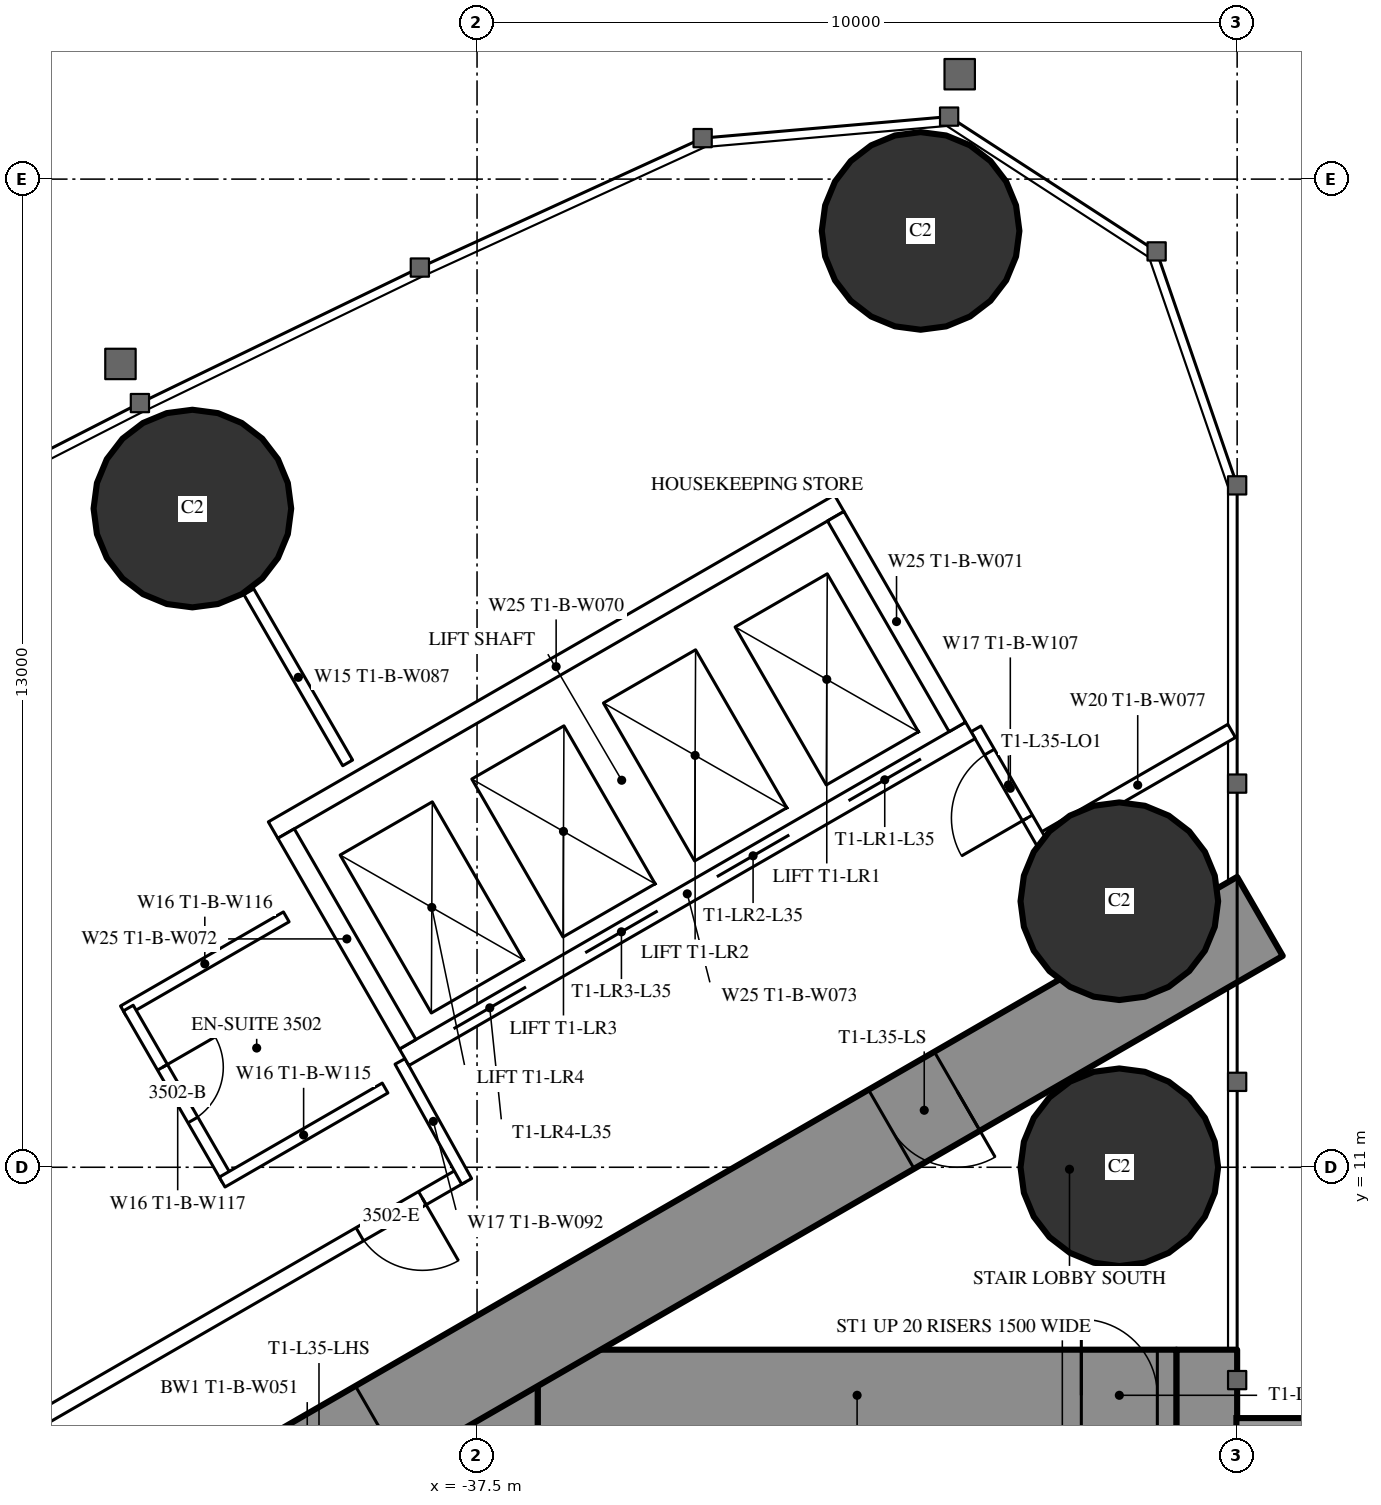
"""IFC4 building model, lengths in metres.
Left out: names, types, materials, properties, quantities, classifications, styles, units other than length and angle.
Written with IfcOpenShell. Run it as: python <this file> out.ifc"""

import sys

from ifc_helpers import new_model, si_unit, direction, frame, frame_2d, origin, origin_2d, place, context, subcontext, project, spatial, rectangle, hollow_circle, extrude, element, fill, save


model = new_model("IFC4")
c1 = context("Model", 3, precision=1e-05, world=origin(), true_north=direction((0.0, 1.0)))
c2 = subcontext(c1, "Body", "Model", "MODEL_VIEW")
j1 = project(units=[si_unit("LENGTHUNIT", "METRE"), si_unit("PLANEANGLEUNIT", "RADIAN")], contexts=[c1])
p1 = place(None, origin())
s1 = spatial("IfcSite", under=j1, at=p1, CompositionType="ELEMENT")
p2 = place(p1, origin())
s2 = spatial("IfcBuilding", under=s1, at=p2, CompositionType="ELEMENT")
p3 = place(p2, frame((0.0, 0.0, 132.6)))
s3 = spatial("IfcBuildingStorey", under=s2, at=p3, CompositionType="ELEMENT", Elevation=132.6)
for number, where, z_axis, x_axis in (
    (1, (-31.665, 23.318, 0.0), (0.0, 0.0, 1.0), (1.0, 0.0, 0.0)),
    (2, (-29.05, 11.0, 0.0), (0.0, 0.0, 1.0), (1.0, 0.0, 0.0)),
    (3, (-29.05, 14.5, 0.0), (0.0, 0.0, 1.0), (1.0, 0.0, 0.0)),
    (4, (-41.245, 19.666, 0.0), (0.0, 0.0, 1.0), (1.0, 0.0, 0.0)),
):
    element("IfcColumn", number, at=place(p3, frame(where, z_axis=z_axis, x_axis=x_axis)), inside=s3, PredefinedType="COLUMN", context=c2, shape_type="SweptSolid", body=[
        extrude(hollow_circle(Radius=1.3, WallThickness=0.1, at=origin_2d()), origin(), (0.0, 0.0, 1.0), 3.5),
    ])
p4 = place(p3, frame((-27.9, 8.6, 0.0), z_axis=(0.0, 0.0, 1.0), x_axis=(0.0, -1.0, 0.0)))
e5 = element("IfcWall", 5, at=p4, inside=s3, PredefinedType="SHEAR", context=c2, shape_type="SweptSolid", body=[
    extrude(rectangle(XDim=17.2, YDim=0.8, at=frame_2d((8.6, 0.0))), origin(), (0.0, 0.0, 1.0), 3.5),
])
p5 = place(p4, frame((2.45, 0.0, 0.6)))
e6 = element("IfcOpeningElement", 6, at=p5, cuts=e5, PredefinedType="OPENING", context=c2, shape_type="SweptSolid", body=[
    extrude(rectangle(XDim=0.6, YDim=2.1, at=frame_2d((0.3, 1.05))), frame((0.0, 0.41, 0.0), z_axis=(0.0, -1.0, 0.0), x_axis=(1.0, 0.0, 0.0)), (0.0, 0.0, 1.0), 0.82),
])
p6 = place(p4, frame((14.15, 0.0, 0.6)))
e7 = element("IfcOpeningElement", 7, at=p6, cuts=e5, PredefinedType="OPENING", context=c2, shape_type="SweptSolid", body=[
    extrude(rectangle(XDim=0.6, YDim=2.1, at=frame_2d((0.3, 1.05))), frame((0.0, 0.41, 0.0), z_axis=(0.0, -1.0, 0.0), x_axis=(1.0, 0.0, 0.0)), (0.0, 0.0, 1.0), 0.82),
])
p7 = place(p3, frame((-37.3, 8.6, 0.0), z_axis=(0.0, 0.0, 1.0), x_axis=(0.0, -1.0, 0.0)))
e8 = element("IfcWall", 8, at=p7, inside=s3, PredefinedType="SHEAR", context=c2, shape_type="SweptSolid", body=[
    extrude(rectangle(XDim=17.2, YDim=1.2, at=frame_2d((8.6, 0.0))), origin(), (0.0, 0.0, 1.0), 3.5),
])
p8 = place(p7, frame((7.7, 0.0, 0.0)))
e9 = element("IfcOpeningElement", 9, at=p8, cuts=e8, PredefinedType="OPENING", context=c2, shape_type="SweptSolid", body=[
    extrude(rectangle(XDim=1.8, YDim=2.2, at=frame_2d((0.9, 1.1))), frame((0.0, 0.61, 0.0), z_axis=(0.0, -1.0, 0.0), x_axis=(1.0, 0.0, 0.0)), (0.0, 0.0, 1.0), 1.22),
])
p9 = place(p3, frame((-28.3, 8.0, 0.0), z_axis=(0.0, 0.0, 1.0), x_axis=(-1.0, 0.0, 0.0)))
e10 = element("IfcWall", 10, at=p9, inside=s3, PredefinedType="SHEAR", context=c2, shape_type="SweptSolid", body=[
    extrude(rectangle(XDim=8.4, YDim=1.2, at=frame_2d((4.2, 0.0))), origin(), (0.0, 0.0, 1.0), 3.5),
])
p10 = place(p9, frame((0.25, 0.0, 0.0)))
e11 = element("IfcOpeningElement", 11, at=p10, cuts=e10, PredefinedType="OPENING", context=c2, shape_type="SweptSolid", body=[
    extrude(rectangle(XDim=1.0, YDim=2.2, at=frame_2d((0.5, 1.1))), frame((0.0, 0.61, 0.0), z_axis=(0.0, -1.0, 0.0), x_axis=(1.0, 0.0, 0.0)), (0.0, 0.0, 1.0), 1.22),
])
p11 = place(p3, frame((-27.2, 14.3, 0.0), z_axis=(0.0, 0.0, 1.0), x_axis=(-0.866026593062, -0.499997940104, 0.0)))
e12 = element("IfcWall", 12, at=p11, inside=s3, PredefinedType="SHEAR", context=c2, shape_type="SweptSolid", body=[
    extrude(rectangle(XDim=28.946, YDim=1.2, at=frame_2d((14.473, 0.0))), origin(), (0.0, 0.0, 1.0), 3.5),
])
p12 = place(p11, frame((4.6, 0.0, 0.0)))
e13 = element("IfcOpeningElement", 13, at=p12, cuts=e12, PredefinedType="OPENING", context=c2, shape_type="SweptSolid", body=[
    extrude(rectangle(XDim=1.0, YDim=2.2, at=frame_2d((0.5, 1.1))), frame((0.0, 0.61, 0.0), z_axis=(0.0, -1.0, 0.0), x_axis=(1.0, 0.0, 0.0)), (0.0, 0.0, 1.0), 1.22),
])
p13 = place(p11, frame((13.395, 0.0, 0.0)))
e14 = element("IfcOpeningElement", 14, at=p13, cuts=e12, PredefinedType="OPENING", context=c2, shape_type="SweptSolid", body=[
    extrude(rectangle(XDim=1.8, YDim=2.2, at=frame_2d((0.9, 1.1))), frame((0.0, 0.61, 0.0), z_axis=(0.0, -1.0, 0.0), x_axis=(1.0, 0.0, 0.0)), (0.0, 0.0, 1.0), 1.22),
])
p14 = place(p3, frame((-39.202, 16.32, 0.0), z_axis=(0.0, 0.0, 1.0), x_axis=(-0.499947391036, 0.866055775454, 0.0)))
e15 = element("IfcWall", 15, at=p14, inside=s3, PredefinedType="PARTITIONING", context=c2, shape_type="SweptSolid", body=[
    extrude(rectangle(XDim=2.599, YDim=0.15, at=frame_2d((1.3, 0.0))), origin(), (0.0, 0.0, 1.0), 3.25),
])
p15 = place(p3, frame((-27.572, 16.741, 0.0), z_axis=(0.0, 0.0, 1.0), x_axis=(-0.866034618596, -0.499984039138, 0.0)))
e16 = element("IfcWall", 16, at=p15, inside=s3, PredefinedType="PARTITIONING", context=c2, shape_type="SweptSolid", body=[
    extrude(rectangle(XDim=2.854, YDim=0.2, at=frame_2d((1.427, 0.0))), origin(), (0.0, 0.0, 1.0), 3.25),
])
p16 = place(p3, frame((-37.7, 10.894, 0.0), z_axis=(0.0, 0.0, 1.0), x_axis=(-0.866027905338, -0.499995667157, 0.0)))
e17 = element("IfcWall", 17, at=p16, inside=s3, PredefinedType="PARTITIONING", context=c2, shape_type="SweptSolid", body=[
    extrude(rectangle(XDim=21.787, YDim=0.2, at=frame_2d((10.894, 0.0))), origin(), (0.0, 0.0, 1.0), 3.25),
])
p17 = place(p16, frame((17.711, 0.0, 0.0)))
e18 = element("IfcOpeningElement", 18, at=p17, cuts=e17, PredefinedType="OPENING", context=c2, shape_type="SweptSolid", body=[
    extrude(rectangle(XDim=0.95, YDim=2.2, at=frame_2d((0.475, 1.1))), frame((0.0, 0.11, 0.0), z_axis=(0.0, -1.0, 0.0), x_axis=(1.0, 0.0, 0.0)), (0.0, 0.0, 1.0), 0.22),
])
p18 = place(p16, frame((19.399, 0.0, 0.0)))
e19 = element("IfcOpeningElement", 19, at=p18, cuts=e17, PredefinedType="OPENING", context=c2, shape_type="SweptSolid", body=[
    extrude(rectangle(XDim=1.8, YDim=2.2, at=frame_2d((0.9, 1.1))), frame((0.0, 0.11, 0.0), z_axis=(0.0, -1.0, 0.0), x_axis=(1.0, 0.0, 0.0)), (0.0, 0.0, 1.0), 0.22),
])
p19 = place(p16, frame((0.6, 0.0, 0.0)))
e20 = element("IfcOpeningElement", 20, at=p19, cuts=e17, PredefinedType="OPENING", context=c2, shape_type="SweptSolid", body=[
    extrude(rectangle(XDim=0.95, YDim=2.2, at=frame_2d((0.475, 1.1))), frame((0.0, 0.11, 0.0), z_axis=(0.0, -1.0, 0.0), x_axis=(1.0, 0.0, 0.0)), (0.0, 0.0, 1.0), 0.22),
])
p20 = place(p3, frame((-38.513, 12.392, 0.0), z_axis=(0.0, 0.0, 1.0), x_axis=(0.485585508183, -0.874189175317, 0.0)))
e21 = element("IfcWall", 21, at=p20, inside=s3, PredefinedType="PARTITIONING", context=c2, shape_type="SweptSolid", body=[
    extrude(rectangle(XDim=1.805, YDim=0.15, at=frame_2d((0.902, 0.0))), origin(), (0.0, 0.0, 1.0), 3.25),
])
p21 = place(p3, frame((-30.033, 15.205, 0.0), z_axis=(0.0, 0.0, 1.0), x_axis=(-0.499980071345, 0.866036909293, 0.0)))
e22 = element("IfcWall", 22, at=p21, inside=s3, PredefinedType="PARTITIONING", context=c2, shape_type="SweptSolid", body=[
    extrude(rectangle(XDim=1.805, YDim=0.15, at=frame_2d((0.902, 0.0))), origin(), (0.0, 0.0, 1.0), 2.2),
])
p22 = place(p21, frame((0.452, 0.0, 0.0)))
e23 = element("IfcOpeningElement", 23, at=p22, cuts=e22, PredefinedType="OPENING", context=c2, shape_type="SweptSolid", body=[
    extrude(rectangle(XDim=1.0, YDim=2.2, at=frame_2d((0.5, 1.1))), frame((0.0, 0.085, 0.0), z_axis=(0.0, -1.0, 0.0), x_axis=(1.0, 0.0, 0.0)), (0.0, 0.0, 1.0), 0.17),
])
p23 = place(p3, frame((-40.01, 14.294, 0.0), z_axis=(0.0, 0.0, 1.0), x_axis=(-0.866031185235, -0.4999899861, 0.0)))
e24 = element("IfcWall", 24, at=p23, inside=s3, PredefinedType="PARTITIONING", context=c2, shape_type="SweptSolid", body=[
    extrude(rectangle(XDim=2.475, YDim=0.15, at=frame_2d((1.238, 0.0))), origin(), (0.0, 0.0, 1.0), 3.25),
])
p24 = place(p3, frame((-40.788, 10.843, 0.0), z_axis=(0.0, 0.0, 1.0), x_axis=(-0.500006934395, 0.866021400173, 0.0)))
e25 = element("IfcWall", 25, at=p24, inside=s3, PredefinedType="PARTITIONING", context=c2, shape_type="SweptSolid", body=[
    extrude(rectangle(XDim=2.6, YDim=0.15, at=frame_2d((1.3, 0.0))), origin(), (0.0, 0.0, 1.0), 3.25),
])
p25 = place(p24, frame((0.9, 0.0, 0.0)))
e26 = element("IfcOpeningElement", 26, at=p25, cuts=e25, PredefinedType="OPENING", context=c2, shape_type="SweptSolid", body=[
    extrude(rectangle(XDim=0.8, YDim=2.2, at=frame_2d((0.4, 1.1))), frame((0.0, 0.085, 0.0), z_axis=(0.0, -1.0, 0.0), x_axis=(1.0, 0.0, 0.0)), (0.0, 0.0, 1.0), 0.17),
])
p26 = place(p3, frame((-38.71, 12.042, 0.0), z_axis=(0.0, 0.0, 1.0), x_axis=(-0.86604923931, -0.499958713387, 0.0)))
e27 = element("IfcWall", 27, at=p26, inside=s3, PredefinedType="PARTITIONING", context=c2, shape_type="SweptSolid", body=[
    extrude(rectangle(XDim=2.475, YDim=0.15, at=frame_2d((1.237, 0.0))), origin(), (0.0, 0.0, 1.0), 3.25),
])
p27 = place(p3, frame((-31.01, 16.747, 0.0), z_axis=(0.0, 0.0, 1.0), x_axis=(-0.866028165386, -0.499995216735, 0.0)))
e28 = element("IfcWall", 28, at=p27, inside=s3, PredefinedType="PARTITIONING", context=c2, shape_type="SweptSolid", body=[
    extrude(rectangle(XDim=8.6, YDim=0.25, at=frame_2d((4.3, 0.0))), origin(), (0.0, 0.0, 1.0), 3.25),
])
p28 = place(p27, frame((0.75, 0.0, 0.0)))
e29 = element("IfcOpeningElement", 29, at=p28, cuts=e28, PredefinedType="OPENING", context=c2, shape_type="SweptSolid", body=[
    extrude(rectangle(XDim=1.1, YDim=2.2, at=frame_2d((0.55, 1.1))), frame((0.0, 0.135, 0.0), z_axis=(0.0, -1.0, 0.0), x_axis=(1.0, 0.0, 0.0)), (0.0, 0.0, 1.0), 0.27),
])
p29 = place(p27, frame((2.75, 0.0, 0.0)))
e30 = element("IfcOpeningElement", 30, at=p29, cuts=e28, PredefinedType="OPENING", context=c2, shape_type="SweptSolid", body=[
    extrude(rectangle(XDim=1.1, YDim=2.2, at=frame_2d((0.55, 1.1))), frame((0.0, 0.135, 0.0), z_axis=(0.0, -1.0, 0.0), x_axis=(1.0, 0.0, 0.0)), (0.0, 0.0, 1.0), 0.27),
])
p30 = place(p27, frame((4.75, 0.0, 0.0)))
e31 = element("IfcOpeningElement", 31, at=p30, cuts=e28, PredefinedType="OPENING", context=c2, shape_type="SweptSolid", body=[
    extrude(rectangle(XDim=1.1, YDim=2.2, at=frame_2d((0.55, 1.1))), frame((0.0, 0.135, 0.0), z_axis=(0.0, -1.0, 0.0), x_axis=(1.0, 0.0, 0.0)), (0.0, 0.0, 1.0), 0.27),
])
p31 = place(p27, frame((6.75, 0.0, 0.0)))
e32 = element("IfcOpeningElement", 32, at=p31, cuts=e28, PredefinedType="OPENING", context=c2, shape_type="SweptSolid", body=[
    extrude(rectangle(XDim=1.1, YDim=2.2, at=frame_2d((0.55, 1.1))), frame((0.0, 0.135, 0.0), z_axis=(0.0, -1.0, 0.0), x_axis=(1.0, 0.0, 0.0)), (0.0, 0.0, 1.0), 0.27),
])
p32 = place(p3, frame((-32.736, 19.736, 0.0), z_axis=(0.0, 0.0, 1.0), x_axis=(-0.866028165386, -0.499995216735, 0.0)))
e33 = element("IfcWall", 33, at=p32, inside=s3, PredefinedType="PARTITIONING", context=c2, shape_type="SweptSolid", body=[
    extrude(rectangle(XDim=8.6, YDim=0.25, at=frame_2d((4.3, 0.0))), origin(), (0.0, 0.0, 1.0), 3.25),
])
p33 = place(p3, frame((-31.181, 16.793, 0.0), z_axis=(0.0, 0.0, 1.0), x_axis=(-0.499929347863, 0.866066190972, 0.0)))
e34 = element("IfcWall", 34, at=p33, inside=s3, PredefinedType="PARTITIONING", context=c2, shape_type="SweptSolid", body=[
    extrude(rectangle(XDim=3.201, YDim=0.25, at=frame_2d((1.6, 0.0))), origin(), (0.0, 0.0, 1.0), 3.25),
])
p34 = place(p3, frame((-38.413, 12.618, 0.0), z_axis=(0.0, 0.0, 1.0), x_axis=(-0.499872130319, 0.866099216793, 0.0)))
e35 = element("IfcWall", 35, at=p34, inside=s3, PredefinedType="PARTITIONING", context=c2, shape_type="SweptSolid", body=[
    extrude(rectangle(XDim=3.2, YDim=0.25, at=frame_2d((1.6, 0.0))), origin(), (0.0, 0.0, 1.0), 3.25),
])
p35 = place(p25, origin())
e36 = element("IfcDoor", 36, at=p35, inside=s3, OperationType="SINGLE_SWING_RIGHT", PredefinedType="DOOR", context=c2, shape_type="SweptSolid", body=[
    extrude(rectangle(XDim=0.8, YDim=2.2, at=frame_2d((0.4, 1.1))), frame((0.0, 0.025, 0.0), z_axis=(0.0, -1.0, 0.0), x_axis=(1.0, 0.0, 0.0)), (0.0, 0.0, 1.0), 0.05),
])
fill(e26, e36)
p36 = place(p19, origin())
e37 = element("IfcDoor", 37, at=p36, inside=s3, OperationType="SINGLE_SWING_LEFT", PredefinedType="DOOR", context=c2, shape_type="SweptSolid", body=[
    extrude(rectangle(XDim=0.95, YDim=2.2, at=frame_2d((0.475, 1.1))), frame((0.0, 0.025, 0.0), z_axis=(0.0, -1.0, 0.0), x_axis=(1.0, 0.0, 0.0)), (0.0, 0.0, 1.0), 0.05),
])
fill(e20, e37)
p37 = place(p22, origin())
e38 = element("IfcDoor", 38, at=p37, inside=s3, OperationType="SINGLE_SWING_LEFT", PredefinedType="DOOR", context=c2, shape_type="SweptSolid", body=[
    extrude(rectangle(XDim=1.0, YDim=2.2, at=frame_2d((0.5, 1.1))), frame((0.0, 0.025, 0.0), z_axis=(0.0, -1.0, 0.0), x_axis=(1.0, 0.0, 0.0)), (0.0, 0.0, 1.0), 0.05),
])
fill(e23, e38)
p38 = place(p12, origin())
e39 = element("IfcDoor", 39, at=p38, inside=s3, OperationType="SINGLE_SWING_LEFT", PredefinedType="DOOR", context=c2, shape_type="SweptSolid", body=[
    extrude(rectangle(XDim=1.0, YDim=2.2, at=frame_2d((0.5, 1.1))), frame((0.0, 0.025, 0.0), z_axis=(0.0, -1.0, 0.0), x_axis=(1.0, 0.0, 0.0)), (0.0, 0.0, 1.0), 0.05),
])
fill(e13, e39)
p39 = place(p13, origin())
e40 = element("IfcDoor", 40, at=p39, inside=s3, OperationType="DOUBLE_DOOR_SINGLE_SWING", PredefinedType="DOOR", context=c2, shape_type="SweptSolid", body=[
    extrude(rectangle(XDim=1.8, YDim=2.2, at=frame_2d((0.9, 1.1))), frame((0.0, 0.025, 0.0), z_axis=(0.0, -1.0, 0.0), x_axis=(1.0, 0.0, 0.0)), (0.0, 0.0, 1.0), 0.05),
])
fill(e14, e40)
p40 = place(p10, origin())
e41 = element("IfcDoor", 41, at=p40, inside=s3, OperationType="SINGLE_SWING_RIGHT", PredefinedType="DOOR", context=c2, shape_type="SweptSolid", body=[
    extrude(rectangle(XDim=1.0, YDim=2.2, at=frame_2d((0.5, 1.1))), frame((0.0, 0.025, 0.0), z_axis=(0.0, -1.0, 0.0), x_axis=(1.0, 0.0, 0.0)), (0.0, 0.0, 1.0), 0.05),
])
fill(e11, e41)
p41 = place(p28, origin())
e42 = element("IfcDoor", 42, at=p41, inside=s3, OperationType="DOUBLE_DOOR_SLIDING", PredefinedType="USERDEFINED", context=c2, shape_type="SweptSolid", body=[
    extrude(rectangle(XDim=1.1, YDim=2.2, at=frame_2d((0.55, 1.1))), frame((0.0, 0.025, 0.0), z_axis=(0.0, -1.0, 0.0), x_axis=(1.0, 0.0, 0.0)), (0.0, 0.0, 1.0), 0.05),
])
fill(e29, e42)
p42 = place(p29, origin())
e43 = element("IfcDoor", 43, at=p42, inside=s3, OperationType="DOUBLE_DOOR_SLIDING", PredefinedType="USERDEFINED", context=c2, shape_type="SweptSolid", body=[
    extrude(rectangle(XDim=1.1, YDim=2.2, at=frame_2d((0.55, 1.1))), frame((0.0, 0.025, 0.0), z_axis=(0.0, -1.0, 0.0), x_axis=(1.0, 0.0, 0.0)), (0.0, 0.0, 1.0), 0.05),
])
fill(e30, e43)
p43 = place(p30, origin())
e44 = element("IfcDoor", 44, at=p43, inside=s3, OperationType="DOUBLE_DOOR_SLIDING", PredefinedType="USERDEFINED", context=c2, shape_type="SweptSolid", body=[
    extrude(rectangle(XDim=1.1, YDim=2.2, at=frame_2d((0.55, 1.1))), frame((0.0, 0.025, 0.0), z_axis=(0.0, -1.0, 0.0), x_axis=(1.0, 0.0, 0.0)), (0.0, 0.0, 1.0), 0.05),
])
fill(e31, e44)
p44 = place(p31, origin())
e45 = element("IfcDoor", 45, at=p44, inside=s3, OperationType="DOUBLE_DOOR_SLIDING", PredefinedType="USERDEFINED", context=c2, shape_type="SweptSolid", body=[
    extrude(rectangle(XDim=1.1, YDim=2.2, at=frame_2d((0.55, 1.1))), frame((0.0, 0.025, 0.0), z_axis=(0.0, -1.0, 0.0), x_axis=(1.0, 0.0, 0.0)), (0.0, 0.0, 1.0), 0.05),
])
fill(e32, e45)
save(model, sys.argv[1])
